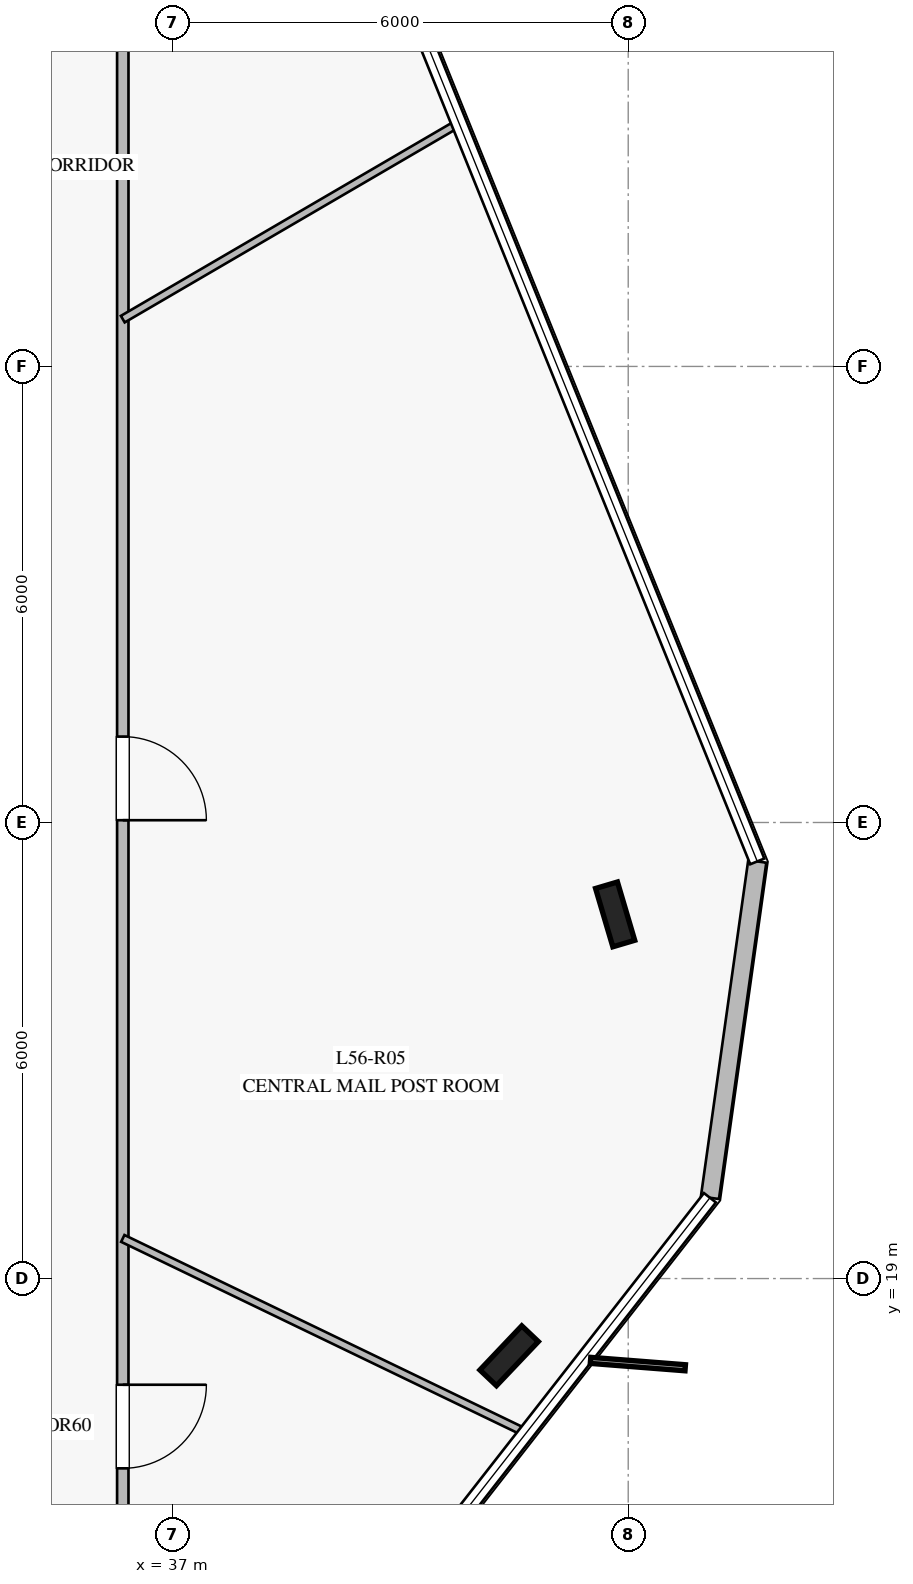
"""IFC4 building model, lengths in metres.
Left out: names, types, materials, properties, quantities, classifications, styles, units other than length and angle.
Written with IfcOpenShell. Run it as: python <this file> out.ifc"""

import sys

from ifc_helpers import new_model, si_unit, direction, frame, frame_2d, origin, origin_2d, place, context, subcontext, project, spatial, rectangle, i_section, extrude, element, fill, save


model = new_model("IFC4")
c1 = context("Model", 3, precision=1e-05, world=origin(), true_north=direction((0.0, 1.0)))
c2 = subcontext(c1, "Body", "Model", "MODEL_VIEW")
j1 = project(units=[si_unit("LENGTHUNIT", "METRE"), si_unit("PLANEANGLEUNIT", "RADIAN")], contexts=[c1])
p1 = place(None, origin())
s1 = spatial("IfcSite", under=j1, at=p1, CompositionType="ELEMENT")
p2 = place(p1, origin())
s2 = spatial("IfcBuilding", under=s1, at=p2, CompositionType="ELEMENT")
p3 = place(p2, frame((0.0, 0.0, 232.8)))
s3 = spatial("IfcBuildingStorey", under=s2, at=p3, CompositionType="ELEMENT", Elevation=232.8)
for number, where, z_axis, x_axis in (
    (1, (41.433, 17.984, 0.0), (0.0, 0.0, 1.0), (0.688, 0.725, 0.0)),
    (2, (42.828, 23.791, 0.0), (0.0, 0.0, 1.0), (-0.284, 0.959, 0.0)),
):
    element("IfcColumn", number, at=place(p3, frame(where, z_axis=z_axis, x_axis=x_axis)), inside=s3, PredefinedType="COLUMN", context=c2, shape_type="SweptSolid", body=[
        extrude(i_section(OverallWidth=0.3, OverallDepth=0.8, WebThickness=0.018, FlangeThickness=0.033, at=origin_2d()), origin(), (0.0, 0.0, 1.0), 4.0),
    ])
p4 = place(p3, frame((44.075, 20.063, 0.0), z_axis=(0.0, 0.0, 1.0), x_axis=(0.139424759628, 0.990232667812, 0.0)))
e3 = element("IfcWall", 3, at=p4, inside=s3, PredefinedType="STANDARD", context=c2, shape_type="SweptSolid", body=[
    extrude(rectangle(XDim=4.469, YDim=0.24, at=frame_2d((2.234, 0.0))), origin(), (0.0, 0.0, 1.0), 3.78),
])
p5 = place(p3, frame((36.35, 35.75, 0.0), z_axis=(0.0, 0.0, 1.0), x_axis=(0.0, -1.0, 0.0)))
e4 = element("IfcWall", 4, at=p5, inside=s3, PredefinedType="PARTITIONING", context=c2, shape_type="SweptSolid", body=[
    extrude(rectangle(XDim=21.5, YDim=0.15, at=frame_2d((10.75, 0.0))), origin(), (0.0, 0.0, 1.0), 3.05),
])
p6 = place(p5, frame((18.147, 0.0, 0.0)))
e5 = element("IfcOpeningElement", 5, at=p6, cuts=e4, PredefinedType="OPENING", context=c2, shape_type="SweptSolid", body=[
    extrude(rectangle(XDim=1.1, YDim=2.2, at=frame_2d((0.55, 1.1))), frame((0.0, 0.085, 0.0), z_axis=(0.0, -1.0, 0.0), x_axis=(1.0, 0.0, 0.0)), (0.0, 0.0, 1.0), 0.17),
])
p7 = place(p5, frame((9.62, 0.0, 0.0)))
e6 = element("IfcOpeningElement", 6, at=p7, cuts=e4, PredefinedType="OPENING", context=c2, shape_type="SweptSolid", body=[
    extrude(rectangle(XDim=1.1, YDim=2.2, at=frame_2d((0.55, 1.1))), frame((0.0, 0.085, 0.0), z_axis=(0.0, -1.0, 0.0), x_axis=(1.0, 0.0, 0.0)), (0.0, 0.0, 1.0), 0.17),
])
p8 = place(p3, frame((36.35, 19.528, 0.0), z_axis=(0.0, 0.0, 1.0), x_axis=(0.900766359383, -0.434304001597, 0.0)))
e7 = element("IfcWall", 7, at=p8, inside=s3, PredefinedType="MOVABLE", context=c2, shape_type="SweptSolid", body=[
    extrude(rectangle(XDim=5.876, YDim=0.1, at=frame_2d((2.938, 0.0))), origin(), (0.0, 0.0, 1.0), 3.18),
])
p9 = place(p3, frame((36.35, 31.622, 0.0), z_axis=(0.0, 0.0, 1.0), x_axis=(0.863766757212, 0.503891842695, 0.0)))
e8 = element("IfcWall", 8, at=p9, inside=s3, PredefinedType="MOVABLE", context=c2, shape_type="SweptSolid", body=[
    extrude(rectangle(XDim=5.104, YDim=0.1, at=frame_2d((2.552, 0.0))), origin(), (0.0, 0.0, 1.0), 3.18),
])
p10 = place(p6, origin())
e9 = element("IfcDoor", 9, at=p10, inside=s3, OperationType="SINGLE_SWING_LEFT", PredefinedType="DOOR", context=c2, shape_type="SweptSolid", body=[
    extrude(rectangle(XDim=1.1, YDim=2.2, at=frame_2d((0.55, 1.1))), frame((0.0, 0.025, 0.0), z_axis=(0.0, -1.0, 0.0), x_axis=(1.0, 0.0, 0.0)), (0.0, 0.0, 1.0), 0.05),
])
fill(e5, e9)
p11 = place(p7, origin())
e10 = element("IfcDoor", 10, at=p11, inside=s3, OperationType="SINGLE_SWING_RIGHT", PredefinedType="DOOR", context=c2, shape_type="SweptSolid", body=[
    extrude(rectangle(XDim=1.1, YDim=2.2, at=frame_2d((0.55, 1.1))), frame((0.0, 0.025, 0.0), z_axis=(0.0, -1.0, 0.0), x_axis=(1.0, 0.0, 0.0)), (0.0, 0.0, 1.0), 0.05),
])
fill(e6, e10)
save(model, sys.argv[1])
